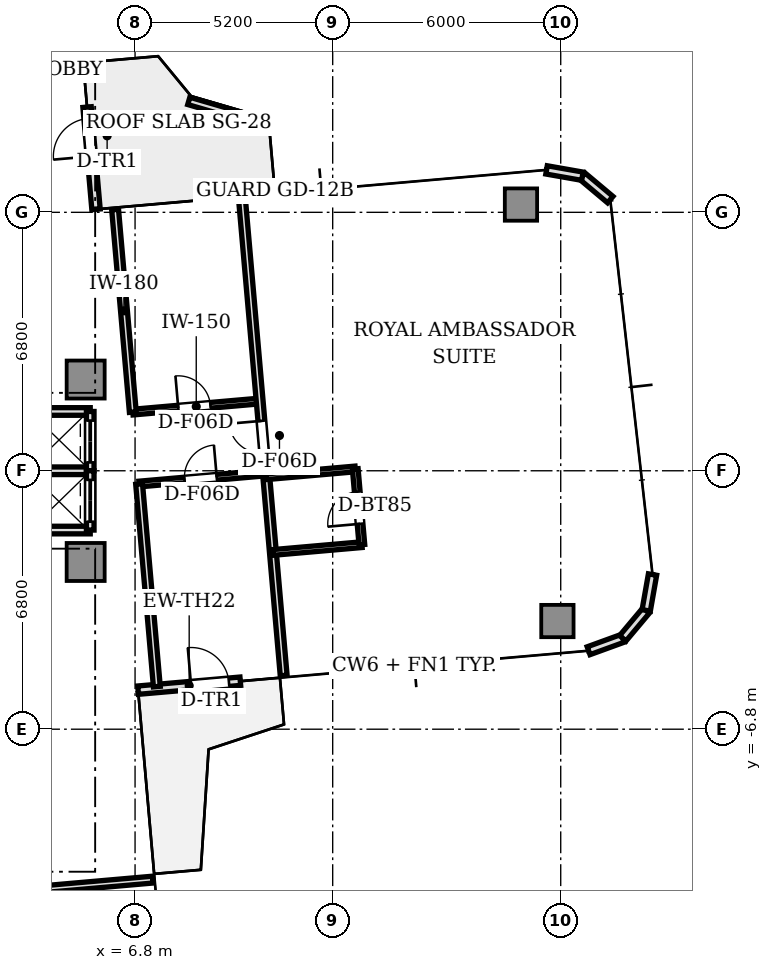
"""IFC4 building model, lengths in metres.
Left out: names, types, materials, properties, quantities, classifications, styles, units other than length and angle.
Written with IfcOpenShell. Run it as: python <this file> out.ifc"""

import sys

from ifc_helpers import new_model, si_unit, direction, frame, frame_2d, origin, origin_2d, place, context, subcontext, project, spatial, rectangle, extrude, source, transform, mapped, element, fill, save


model = new_model("IFC4")
c1 = context("Model", 3, precision=1e-05, world=origin(), true_north=direction((0.0, 1.0)))
c2 = subcontext(c1, "Body", "Model", "MODEL_VIEW")
j1 = project(units=[si_unit("LENGTHUNIT", "METRE"), si_unit("PLANEANGLEUNIT", "RADIAN")], contexts=[c1])
p1 = place(None, origin())
s1 = spatial("IfcSite", under=j1, at=p1, CompositionType="ELEMENT")
p2 = place(p1, origin())
s2 = spatial("IfcBuilding", under=s1, at=p2, CompositionType="ELEMENT")
p3 = place(p2, frame((0.0, 0.0, 170.7)))
s3 = spatial("IfcBuildingStorey", under=s2, at=p3, CompositionType="ELEMENT", Elevation=170.7)
m1 = source(origin(), c2, "Body", "SweptSolid", [
    extrude(rectangle(XDim=1.0, YDim=1.0, at=origin_2d()), origin(), (0.0, 0.0, 1.0), 4.26),
])
for number, where, z_axis, x_axis in (
    (1, (5.5, 2.4, 0.0), (0.0, 0.0, 1.0), (1.0, 0.0, 0.0)),
    (2, (5.5, -2.4, 0.0), (0.0, 0.0, 1.0), (1.0, 0.0, 0.0)),
):
    element("IfcColumn", number, at=place(p3, frame(where, z_axis=z_axis, x_axis=x_axis)), inside=s3, PredefinedType="COLUMN", context=c2, shape_type="MappedRepresentation", body=[
        mapped(m1, transform((0.0, 0.0, 0.0), scale=1.0)),
    ])
m2 = source(origin(), c2, "Body", "SweptSolid", [
    extrude(rectangle(XDim=0.85, YDim=0.85, at=origin_2d()), origin(), (0.0, 0.0, 1.0), 4.26),
])
for number, where, z_axis, x_axis in (
    (3, (17.913, -3.954, 0.0), (0.0, 0.0, 1.0), (1.0, 0.0, 0.0)),
    (4, (16.954, 7.004, 0.0), (0.0, 0.0, 1.0), (1.0, 0.0, 0.0)),
):
    element("IfcColumn", number, at=place(p3, frame(where, z_axis=z_axis, x_axis=x_axis)), inside=s3, PredefinedType="COLUMN", context=c2, shape_type="MappedRepresentation", body=[
        mapped(m2, transform((0.0, 0.0, 0.0), scale=1.0)),
    ])
p4 = place(p3, frame((6.879, -5.772, 0.0), z_axis=(0.0, 0.0, 1.0), x_axis=(0.996193619346, 0.087168071984, 0.0)))
e5 = element("IfcWall", 5, at=p4, inside=s3, PredefinedType="STANDARD", context=c2, shape_type="SweptSolid", body=[
    extrude(rectangle(XDim=2.7, YDim=0.22, at=frame_2d((1.35, 0.0))), origin(), (0.0, 0.0, 1.0), 4.26),
])
p5 = place(p4, frame((1.4, 0.0, 0.0)))
e6 = element("IfcOpeningElement", 6, at=p5, cuts=e5, PredefinedType="OPENING", context=c2, shape_type="SweptSolid", body=[
    extrude(rectangle(XDim=1.0, YDim=2.2, at=frame_2d((0.5, 1.1))), frame((0.0, 0.12, 0.0), z_axis=(0.0, -1.0, 0.0), x_axis=(1.0, 0.0, 0.0)), (0.0, 0.0, 1.0), 0.24),
])
p6 = place(p3, frame((18.734, -4.735, 0.0), z_axis=(0.0, 0.0, 1.0), x_axis=(0.939741306239, 0.34188635151, 0.0)))
e7 = element("IfcWall", 7, at=p6, inside=s3, PredefinedType="STANDARD", context=c2, shape_type="SweptSolid", body=[
    extrude(rectangle(XDim=0.958, YDim=0.22, at=frame_2d((0.479, 0.0))), origin(), (0.0, 0.0, 1.0), 4.26),
])
for number, where, z_axis, x_axis in (
    (8, (19.634, -4.408, 0.0), (0.0, 0.0, 1.0), (0.643, 0.766, 0.0)),
    (9, (20.25, -3.674, 0.0), (0.0, 0.0, 1.0), (0.174, 0.985, 0.0)),
):
    element("IfcWall", number, at=place(p3, frame(where, z_axis=z_axis, x_axis=x_axis)), inside=s3, PredefinedType="STANDARD", context=c2, shape_type="SweptSolid", body=[
        extrude(rectangle(XDim=0.958, YDim=0.22, at=frame_2d((0.479, 0.0))), origin(), (0.0, 0.0, 1.0), 4.26),
    ])
p7 = place(p3, frame((19.304, 7.135, 0.0), z_axis=(0.0, 0.0, 1.0), x_axis=(-0.766001159887, 0.642839189107, 0.0)))
e10 = element("IfcWall", 10, at=p7, inside=s3, PredefinedType="STANDARD", context=c2, shape_type="SweptSolid", body=[
    extrude(rectangle(XDim=0.958, YDim=0.22, at=frame_2d((0.479, 0.0))), origin(), (0.0, 0.0, 1.0), 4.26),
])
p8 = place(p3, frame((18.57, 7.75, 0.0), z_axis=(0.0, 0.0, 1.0), x_axis=(-0.984770724397, 0.173858046606, 0.0)))
e11 = element("IfcWall", 11, at=p8, inside=s3, PredefinedType="STANDARD", context=c2, shape_type="SweptSolid", body=[
    extrude(rectangle(XDim=0.958, YDim=0.22, at=frame_2d((0.479, 0.0))), origin(), (0.0, 0.0, 1.0), 4.26),
])
p9 = place(p3, frame((5.772, 6.879, 0.0), z_axis=(0.0, 0.0, 1.0), x_axis=(-0.087168071984, 0.996193619346, 0.0)))
e12 = element("IfcWall", 12, at=p9, inside=s3, PredefinedType="STANDARD", context=c2, shape_type="SweptSolid", body=[
    extrude(rectangle(XDim=2.7, YDim=0.22, at=frame_2d((1.35, 0.0))), origin(), (0.0, 0.0, 1.0), 4.26),
])
p10 = place(p9, frame((1.4, 0.0, 0.0)))
e13 = element("IfcOpeningElement", 13, at=p10, cuts=e12, PredefinedType="OPENING", context=c2, shape_type="SweptSolid", body=[
    extrude(rectangle(XDim=1.0, YDim=2.2, at=frame_2d((0.5, 1.1))), frame((0.0, 0.12, 0.0), z_axis=(0.0, -1.0, 0.0), x_axis=(1.0, 0.0, 0.0)), (0.0, 0.0, 1.0), 0.24),
])
p11 = place(p3, frame((9.885, 9.244, 0.0), z_axis=(0.0, 0.0, 1.0), x_axis=(-0.959963875949, 0.280123824178, 0.0)))
e14 = element("IfcWall", 14, at=p11, inside=s3, PredefinedType="PARAPET", context=c2, shape_type="SweptSolid", body=[
    extrude(rectangle(XDim=1.741, YDim=0.2, at=frame_2d((0.871, 0.0))), origin(), (0.0, 0.0, 1.0), 0.65),
])
for number, where, z_axis, x_axis in (
    (15, (3.98, 1.56, 0.0), (0.0, 0.0, 1.0), (1.0, 0.0, 0.0)),
    (16, (3.98, -1.56, 0.0), (0.0, 0.0, 1.0), (1.0, 0.0, 0.0)),
    (17, (3.98, 0.0, 0.0), (0.0, 0.0, 1.0), (1.0, 0.0, 0.0)),
):
    element("IfcWall", number, at=place(p3, frame(where, z_axis=z_axis, x_axis=x_axis)), inside=s3, PredefinedType="SOLIDWALL", context=c2, shape_type="SweptSolid", body=[
        extrude(rectangle(XDim=1.64, YDim=0.2, at=frame_2d((0.82, 0.0))), origin(), (0.0, 0.0, 1.0), 3.81),
    ])
p12 = place(p3, frame((5.62, 0.0, 0.0), z_axis=(0.0, 0.0, 1.0), x_axis=(0.0, 1.0, 0.0)))
e18 = element("IfcWall", 18, at=p12, inside=s3, PredefinedType="SOLIDWALL", context=c2, shape_type="SweptSolid", body=[
    extrude(rectangle(XDim=1.56, YDim=0.2, at=frame_2d((0.78, 0.0))), origin(), (0.0, 0.0, 1.0), 3.81),
])
p13 = place(p12, frame((0.22, 0.0, 0.0)))
e19 = element("IfcOpeningElement", 19, at=p13, cuts=e18, PredefinedType="OPENING", context=c2, shape_type="SweptSolid", body=[
    extrude(rectangle(XDim=1.1, YDim=2.2, at=frame_2d((0.55, 1.1))), frame((0.0, 0.11, 0.0), z_axis=(0.0, -1.0, 0.0), x_axis=(1.0, 0.0, 0.0)), (0.0, 0.0, 1.0), 0.22),
])
p14 = place(p3, frame((5.62, -1.56, 0.0), z_axis=(0.0, 0.0, 1.0), x_axis=(0.0, 1.0, 0.0)))
e20 = element("IfcWall", 20, at=p14, inside=s3, PredefinedType="SOLIDWALL", context=c2, shape_type="SweptSolid", body=[
    extrude(rectangle(XDim=1.56, YDim=0.2, at=frame_2d((0.78, 0.0))), origin(), (0.0, 0.0, 1.0), 3.81),
])
p15 = place(p14, frame((0.22, 0.0, 0.0)))
e21 = element("IfcOpeningElement", 21, at=p15, cuts=e20, PredefinedType="OPENING", context=c2, shape_type="SweptSolid", body=[
    extrude(rectangle(XDim=1.1, YDim=2.2, at=frame_2d((0.55, 1.1))), frame((0.0, 0.11, 0.0), z_axis=(0.0, -1.0, 0.0), x_axis=(1.0, 0.0, 0.0)), (0.0, 0.0, 1.0), 0.22),
])
p16 = place(p3, frame((6.741, 1.543, 0.0), z_axis=(0.0, 0.0, 1.0), x_axis=(0.996193954812, 0.087164238054, 0.0)))
e22 = element("IfcWall", 22, at=p16, inside=s3, PredefinedType="PARTITIONING", context=c2, shape_type="SweptSolid", body=[
    extrude(rectangle(XDim=3.35, YDim=0.15, at=frame_2d((1.675, 0.0))), origin(), (0.0, 0.0, 1.0), 3.81),
])
p17 = place(p16, frame((1.2, 0.0, 0.0)))
e23 = element("IfcOpeningElement", 23, at=p17, cuts=e22, PredefinedType="OPENING", context=c2, shape_type="SweptSolid", body=[
    extrude(rectangle(XDim=0.85, YDim=2.1, at=frame_2d((0.425, 1.05))), frame((0.0, 0.085, 0.0), z_axis=(0.0, -1.0, 0.0), x_axis=(1.0, 0.0, 0.0)), (0.0, 0.0, 1.0), 0.17),
])
p18 = place(p3, frame((6.907, -0.349, 0.0), z_axis=(0.0, 0.0, 1.0), x_axis=(0.996193954812, 0.087164238054, 0.0)))
e24 = element("IfcWall", 24, at=p18, inside=s3, PredefinedType="PARTITIONING", context=c2, shape_type="SweptSolid", body=[
    extrude(rectangle(XDim=3.35, YDim=0.15, at=frame_2d((1.675, 0.0))), origin(), (0.0, 0.0, 1.0), 3.81),
])
p19 = place(p18, frame((1.2, 0.0, 0.0)))
e25 = element("IfcOpeningElement", 25, at=p19, cuts=e24, PredefinedType="OPENING", context=c2, shape_type="SweptSolid", body=[
    extrude(rectangle(XDim=0.85, YDim=2.1, at=frame_2d((0.425, 1.05))), frame((0.0, 0.085, 0.0), z_axis=(0.0, -1.0, 0.0), x_axis=(1.0, 0.0, 0.0)), (0.0, 0.0, 1.0), 0.17),
])
for number, where, z_axis, x_axis in (
    (26, (6.741, 1.543, 0.0), (0.0, 0.0, 1.0), (-0.087, 0.996, 0.0)),
    (27, (7.373, -5.679, 0.0), (0.0, 0.0, 1.0), (-0.087, 0.996, 0.0)),
):
    element("IfcWall", number, at=place(p3, frame(where, z_axis=z_axis, x_axis=x_axis)), inside=s3, PredefinedType="PARTITIONING", context=c2, shape_type="SweptSolid", body=[
        extrude(rectangle(XDim=5.35, YDim=0.18, at=frame_2d((2.675, 0.0))), origin(), (0.0, 0.0, 1.0), 3.81),
    ])
p20 = place(p3, frame((10.71, -5.387, 0.0), z_axis=(0.0, 0.0, 1.0), x_axis=(-0.087154691724, 0.996194790044, 0.0)))
e28 = element("IfcWall", 28, at=p20, inside=s3, PredefinedType="PARTITIONING", context=c2, shape_type="SweptSolid", body=[
    extrude(rectangle(XDim=12.6, YDim=0.18, at=frame_2d((6.3, 0.0))), origin(), (0.0, 0.0, 1.0), 3.81),
])
p21 = place(p20, frame((5.875, 0.0, 0.0)))
e29 = element("IfcOpeningElement", 29, at=p21, cuts=e28, PredefinedType="OPENING", context=c2, shape_type="SweptSolid", body=[
    extrude(rectangle(XDim=0.85, YDim=2.1, at=frame_2d((0.425, 1.05))), frame((0.0, 0.1, 0.0), z_axis=(0.0, -1.0, 0.0), x_axis=(1.0, 0.0, 0.0)), (0.0, 0.0, 1.0), 0.2),
])
for number, where, z_axis, x_axis in (
    (30, (10.253, -0.157, 0.0), (0.0, 0.0, 1.0), (0.996, 0.087, 0.0)),
    (31, (10.427, -2.149, 0.0), (0.0, 0.0, 1.0), (0.996, 0.087, 0.0)),
):
    element("IfcWall", number, at=place(p3, frame(where, z_axis=z_axis, x_axis=x_axis)), inside=s3, PredefinedType="PARTITIONING", context=c2, shape_type="SweptSolid", body=[
        extrude(rectangle(XDim=2.35, YDim=0.15, at=frame_2d((1.175, 0.0))), origin(), (0.0, 0.0, 1.0), 3.81),
    ])
p22 = place(p3, frame((12.768, -1.945, 0.0), z_axis=(0.0, 0.0, 1.0), x_axis=(-0.087156350505, 0.99619464492, 0.0)))
e32 = element("IfcWall", 32, at=p22, inside=s3, PredefinedType="PARTITIONING", context=c2, shape_type="SweptSolid", body=[
    extrude(rectangle(XDim=2.0, YDim=0.15, at=frame_2d((1.0, 0.0))), origin(), (0.0, 0.0, 1.0), 3.81),
])
p23 = place(p22, frame((0.55, 0.0, 0.0)))
e33 = element("IfcOpeningElement", 33, at=p23, cuts=e32, PredefinedType="OPENING", context=c2, shape_type="SweptSolid", body=[
    extrude(rectangle(XDim=0.85, YDim=2.1, at=frame_2d((0.425, 1.05))), frame((0.0, 0.085, 0.0), z_axis=(0.0, -1.0, 0.0), x_axis=(1.0, 0.0, 0.0)), (0.0, 0.0, 1.0), 0.17),
])
p24 = place(p3, frame((5.287, 11.856, 0.0), z_axis=(0.0, 0.0, 1.0), x_axis=(-0.996194790044, -0.087154691724, 0.0)))
e34 = element("IfcWall", 34, at=p24, inside=s3, PredefinedType="PARTITIONING", context=c2, shape_type="SweptSolid", body=[
    extrude(rectangle(XDim=12.6, YDim=0.15, at=frame_2d((6.3, 0.0))), origin(), (0.0, 0.0, 1.0), 3.81),
])
p25 = place(p24, frame((5.5, 0.0, 0.0)))
e35 = element("IfcOpeningElement", 35, at=p25, cuts=e34, PredefinedType="OPENING", context=c2, shape_type="SweptSolid", body=[
    extrude(rectangle(XDim=1.6, YDim=2.25, at=frame_2d((0.8, 1.125))), frame((0.0, 0.085, 0.0), z_axis=(0.0, -1.0, 0.0), x_axis=(1.0, 0.0, 0.0)), (0.0, 0.0, 1.0), 0.17),
])
p26 = place(p3, frame((-3.095, -11.664, 0.0), z_axis=(0.0, 0.0, 1.0), x_axis=(0.996196061386, 0.087140158824, 0.0)))
e36 = element("IfcWall", 36, at=p26, inside=s3, PredefinedType="PARTITIONING", context=c2, shape_type="SweptSolid", body=[
    extrude(rectangle(XDim=10.4, YDim=0.18, at=frame_2d((5.2, 0.0))), origin(), (0.0, 0.0, 1.0), 3.81),
])
m3 = source(origin(), c2, "Body", "SweptSolid", [
    extrude(rectangle(XDim=1.0, YDim=0.05, at=origin_2d()), origin(), (0.0, 0.0, 1.0), 2.2),
])
p27 = place(p5, frame((0.5, 0.0, 0.0)))
e37 = element("IfcDoor", 37, at=p27, inside=s3, OperationType="SINGLE_SWING_LEFT", PredefinedType="DOOR", context=c2, shape_type="MappedRepresentation", body=[
    mapped(m3, transform((0.0, 0.0, 0.0), scale=1.0)),
])
fill(e6, e37)
p28 = place(p10, frame((0.5, 0.0, 0.0)))
e38 = element("IfcDoor", 38, at=p28, inside=s3, OperationType="SINGLE_SWING_LEFT", PredefinedType="DOOR", context=c2, shape_type="MappedRepresentation", body=[
    mapped(m3, transform((0.0, 0.0, 0.0), scale=1.0)),
])
fill(e13, e38)
m4 = source(origin(), c2, "Body", "SweptSolid", [
    extrude(rectangle(XDim=1.1, YDim=0.05, at=origin_2d()), origin(), (0.0, 0.0, 1.0), 2.2),
])
p29 = place(p13, frame((0.55, 0.0, 0.0)))
e39 = element("IfcDoor", 39, at=p29, inside=s3, OperationType="DOUBLE_DOOR_SLIDING", PredefinedType="DOOR", context=c2, shape_type="MappedRepresentation", body=[
    mapped(m4, transform((0.0, 0.0, 0.0), scale=1.0)),
])
fill(e19, e39)
p30 = place(p15, frame((0.55, 0.0, 0.0)))
e40 = element("IfcDoor", 40, at=p30, inside=s3, OperationType="DOUBLE_DOOR_SLIDING", PredefinedType="DOOR", context=c2, shape_type="MappedRepresentation", body=[
    mapped(m4, transform((0.0, 0.0, 0.0), scale=1.0)),
])
fill(e21, e40)
m5 = source(origin(), c2, "Body", "SweptSolid", [
    extrude(rectangle(XDim=0.85, YDim=0.05, at=origin_2d()), origin(), (0.0, 0.0, 1.0), 2.1),
])
p31 = place(p17, frame((0.425, 0.0, 0.0)))
e41 = element("IfcDoor", 41, at=p31, inside=s3, OperationType="SINGLE_SWING_LEFT", PredefinedType="DOOR", context=c2, shape_type="MappedRepresentation", body=[
    mapped(m5, transform((0.0, 0.0, 0.0), scale=1.0)),
])
fill(e23, e41)
p32 = place(p19, frame((0.425, 0.0, 0.0)))
e42 = element("IfcDoor", 42, at=p32, inside=s3, OperationType="SINGLE_SWING_RIGHT", PredefinedType="DOOR", context=c2, shape_type="MappedRepresentation", body=[
    mapped(m5, transform((0.0, 0.0, 0.0), scale=1.0)),
])
fill(e25, e42)
p33 = place(p23, frame((0.425, 0.0, 0.0)))
e43 = element("IfcDoor", 43, at=p33, inside=s3, OperationType="SINGLE_SWING_LEFT", PredefinedType="DOOR", context=c2, shape_type="MappedRepresentation", body=[
    mapped(m5, transform((0.0, 0.0, 0.0), scale=1.0)),
])
fill(e33, e43)
p34 = place(p21, frame((0.425, 0.0, 0.0)))
e44 = element("IfcDoor", 44, at=p34, inside=s3, OperationType="SINGLE_SWING_RIGHT", PredefinedType="DOOR", context=c2, shape_type="MappedRepresentation", body=[
    mapped(m5, transform((0.0, 0.0, 0.0), scale=1.0)),
])
fill(e29, e44)
save(model, sys.argv[1])
